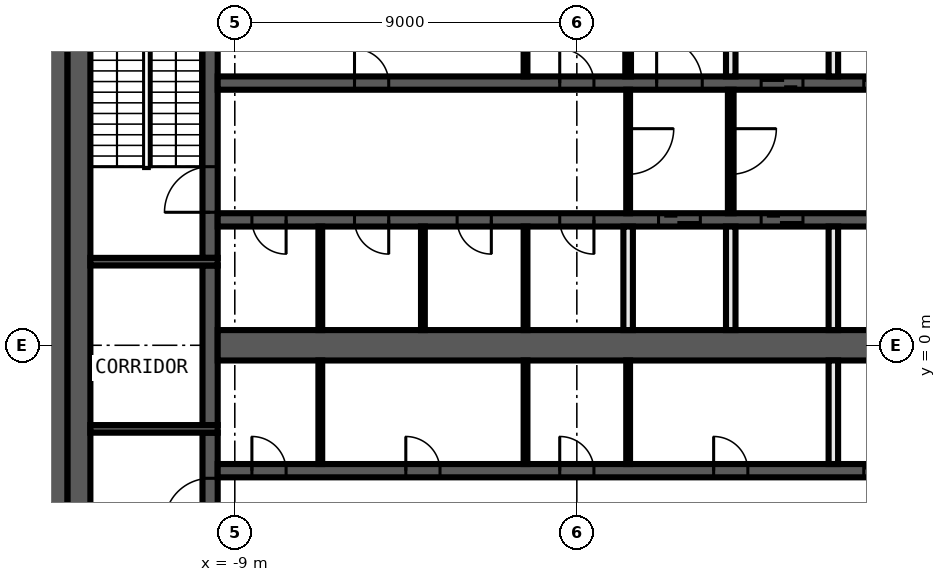
"""IFC4 building model, lengths in metres.
Left out: names, types, materials, properties, quantities, classifications, styles, units other than length and angle.
Written with IfcOpenShell. Run it as: python <this file> out.ifc"""

import sys

from ifc_helpers import new_model, si_unit, direction, frame, frame_2d, origin, place, context, subcontext, project, spatial, rectangle, extrude, element, fill, save


model = new_model("IFC4")
c1 = context("Model", 3, precision=1e-05, world=origin(), true_north=direction((0.0, 1.0)))
c2 = subcontext(c1, "Body", "Model", "MODEL_VIEW")
j1 = project(units=[si_unit("LENGTHUNIT", "METRE"), si_unit("PLANEANGLEUNIT", "RADIAN")], contexts=[c1])
p1 = place(None, origin())
s1 = spatial("IfcSite", under=j1, at=p1, CompositionType="ELEMENT")
p2 = place(p1, origin())
s2 = spatial("IfcBuilding", under=s1, at=p2, CompositionType="ELEMENT")
p3 = place(p2, frame((0.0, 0.0, 332.0)))
s3 = spatial("IfcBuildingStorey", under=s2, at=p3, CompositionType="ELEMENT", Elevation=332.0)
p4 = place(p3, frame((-13.7, -10.4, 0.0), z_axis=(0.0, 0.0, 1.0), x_axis=(0.0, 1.0, 0.0)))
e1 = element("IfcWall", 1, at=p4, inside=s3, PredefinedType="SHEAR", context=c2, shape_type="SweptSolid", body=[
    extrude(rectangle(XDim=20.8, YDim=0.6, at=frame_2d((10.4, 0.0))), origin(), (0.0, 0.0, 1.0), 3.82),
])
p5 = place(p3, frame((-13.1, -9.8, 0.0), z_axis=(0.0, 0.0, 1.0), x_axis=(0.0, 1.0, 0.0)))
e2 = element("IfcWall", 2, at=p5, inside=s3, PredefinedType="SHEAR", context=c2, shape_type="SweptSolid", body=[
    extrude(rectangle(XDim=19.6, YDim=0.6, at=frame_2d((9.8, 0.0))), origin(), (0.0, 0.0, 1.0), 3.82),
])
p6 = place(p3, frame((-9.65, -9.8, 0.0), z_axis=(0.0, 0.0, 1.0), x_axis=(0.0, 1.0, 0.0)))
e3 = element("IfcWall", 3, at=p6, inside=s3, PredefinedType="SHEAR", context=c2, shape_type="SweptSolid", body=[
    extrude(rectangle(XDim=7.5, YDim=0.4, at=frame_2d((3.75, 0.0))), origin(), (0.0, 0.0, 1.0), 3.82),
])
p7 = place(p6, frame((5.1, 0.0, 0.0)))
e4 = element("IfcOpeningElement", 4, at=p7, cuts=e3, PredefinedType="OPENING", context=c2, shape_type="SweptSolid", body=[
    extrude(rectangle(XDim=1.2, YDim=2.1, at=frame_2d((0.6, 1.05))), frame((0.0, 0.21, 0.0), z_axis=(0.0, -1.0, 0.0), x_axis=(1.0, 0.0, 0.0)), (0.0, 0.0, 1.0), 0.42),
])
p8 = place(p3, frame((-9.65, -2.1, 0.0), z_axis=(0.0, 0.0, 1.0), x_axis=(0.0, 1.0, 0.0)))
e5 = element("IfcWall", 5, at=p8, inside=s3, PredefinedType="SHEAR", context=c2, shape_type="SweptSolid", body=[
    extrude(rectangle(XDim=4.2, YDim=0.4, at=frame_2d((2.1, 0.0))), origin(), (0.0, 0.0, 1.0), 3.82),
])
p9 = place(p3, frame((-9.65, 2.3, 0.0), z_axis=(0.0, 0.0, 1.0), x_axis=(0.0, 1.0, 0.0)))
e6 = element("IfcWall", 6, at=p9, inside=s3, PredefinedType="SHEAR", context=c2, shape_type="SweptSolid", body=[
    extrude(rectangle(XDim=7.5, YDim=0.4, at=frame_2d((3.75, 0.0))), origin(), (0.0, 0.0, 1.0), 3.82),
])
p10 = place(p9, frame((1.2, 0.0, 0.0)))
e7 = element("IfcOpeningElement", 7, at=p10, cuts=e6, PredefinedType="OPENING", context=c2, shape_type="SweptSolid", body=[
    extrude(rectangle(XDim=1.2, YDim=2.1, at=frame_2d((0.6, 1.05))), frame((0.0, 0.21, 0.0), z_axis=(0.0, -1.0, 0.0), x_axis=(1.0, 0.0, 0.0)), (0.0, 0.0, 1.0), 0.42),
])
for number, where, z_axis, x_axis in (
    (8, (-9.45, 2.2, 0.0), (0.0, 0.0, 1.0), (-1.0, 0.0, 0.0)),
    (9, (-9.45, -2.2, 0.0), (0.0, 0.0, 1.0), (-1.0, 0.0, 0.0)),
):
    element("IfcWall", number, at=place(p3, frame(where, z_axis=z_axis, x_axis=x_axis)), inside=s3, PredefinedType="SHEAR", context=c2, shape_type="SweptSolid", body=[
        extrude(rectangle(XDim=3.35, YDim=0.2, at=frame_2d((1.675, 0.0))), origin(), (0.0, 0.0, 1.0), 3.82),
    ])
p11 = place(p3, frame((-9.45, 6.9, 0.0), z_axis=(0.0, 0.0, 1.0), x_axis=(1.0, 0.0, 0.0)))
e10 = element("IfcWall", 10, at=p11, inside=s3, PredefinedType="SHEAR", context=c2, shape_type="SweptSolid", body=[
    extrude(rectangle(XDim=18.9, YDim=0.35, at=frame_2d((9.45, 0.0))), origin(), (0.0, 0.0, 1.0), 3.82),
])
p12 = place(p11, frame((11.55, 0.0, 0.0)))
e11 = element("IfcOpeningElement", 11, at=p12, cuts=e10, PredefinedType="OPENING", context=c2, shape_type="SweptSolid", body=[
    extrude(rectangle(XDim=1.2, YDim=2.1, at=frame_2d((0.6, 1.05))), frame((0.0, 0.185, 0.0), z_axis=(0.0, -1.0, 0.0), x_axis=(1.0, 0.0, 0.0)), (0.0, 0.0, 1.0), 0.37),
])
p13 = place(p11, frame((14.3, 0.0, 0.0)))
e12 = element("IfcOpeningElement", 12, at=p13, cuts=e10, PredefinedType="OPENING", context=c2, shape_type="SweptSolid", body=[
    extrude(rectangle(XDim=1.1, YDim=2.1, at=frame_2d((0.55, 1.05))), frame((0.0, 0.185, 0.0), z_axis=(0.0, -1.0, 0.0), x_axis=(1.0, 0.0, 0.0)), (0.0, 0.0, 1.0), 0.37),
])
p14 = place(p11, frame((17.0, 0.0, 0.0)))
e13 = element("IfcOpeningElement", 13, at=p14, cuts=e10, PredefinedType="OPENING", context=c2, shape_type="SweptSolid", body=[
    extrude(rectangle(XDim=1.1, YDim=2.1, at=frame_2d((0.55, 1.05))), frame((0.0, 0.185, 0.0), z_axis=(0.0, -1.0, 0.0), x_axis=(1.0, 0.0, 0.0)), (0.0, 0.0, 1.0), 0.37),
])
p15 = place(p11, frame((3.6, 0.0, 0.0)))
e14 = element("IfcOpeningElement", 14, at=p15, cuts=e10, PredefinedType="OPENING", context=c2, shape_type="SweptSolid", body=[
    extrude(rectangle(XDim=0.9, YDim=2.1, at=frame_2d((0.45, 1.05))), frame((0.0, 0.185, 0.0), z_axis=(0.0, -1.0, 0.0), x_axis=(1.0, 0.0, 0.0)), (0.0, 0.0, 1.0), 0.37),
])
p16 = place(p11, frame((9.0, 0.0, 0.0)))
e15 = element("IfcOpeningElement", 15, at=p16, cuts=e10, PredefinedType="OPENING", context=c2, shape_type="SweptSolid", body=[
    extrude(rectangle(XDim=0.9, YDim=2.1, at=frame_2d((0.45, 1.05))), frame((0.0, 0.185, 0.0), z_axis=(0.0, -1.0, 0.0), x_axis=(1.0, 0.0, 0.0)), (0.0, 0.0, 1.0), 0.37),
])
p17 = place(p3, frame((9.45, 3.3, 0.0), z_axis=(0.0, 0.0, 1.0), x_axis=(-1.0, 0.0, 0.0)))
e16 = element("IfcWall", 16, at=p17, inside=s3, PredefinedType="SHEAR", context=c2, shape_type="SweptSolid", body=[
    extrude(rectangle(XDim=18.9, YDim=0.35, at=frame_2d((9.45, 0.0))), origin(), (0.0, 0.0, 1.0), 3.82),
])
p18 = place(p17, frame((6.2, 0.0, 0.0)))
e17 = element("IfcOpeningElement", 17, at=p18, cuts=e16, PredefinedType="OPENING", context=c2, shape_type="SweptSolid", body=[
    extrude(rectangle(XDim=1.1, YDim=2.1, at=frame_2d((0.55, 1.05))), frame((0.0, 0.185, 0.0), z_axis=(0.0, -1.0, 0.0), x_axis=(1.0, 0.0, 0.0)), (0.0, 0.0, 1.0), 0.37),
])
p19 = place(p17, frame((3.5, 0.0, 0.0)))
e18 = element("IfcOpeningElement", 18, at=p19, cuts=e16, PredefinedType="OPENING", context=c2, shape_type="SweptSolid", body=[
    extrude(rectangle(XDim=1.1, YDim=2.1, at=frame_2d((0.55, 1.05))), frame((0.0, 0.185, 0.0), z_axis=(0.0, -1.0, 0.0), x_axis=(1.0, 0.0, 0.0)), (0.0, 0.0, 1.0), 0.37),
])
p20 = place(p17, frame((0.9, 0.0, 0.0)))
e19 = element("IfcOpeningElement", 19, at=p20, cuts=e16, PredefinedType="OPENING", context=c2, shape_type="SweptSolid", body=[
    extrude(rectangle(XDim=0.9, YDim=2.1, at=frame_2d((0.45, 1.05))), frame((0.0, 0.185, 0.0), z_axis=(0.0, -1.0, 0.0), x_axis=(1.0, 0.0, 0.0)), (0.0, 0.0, 1.0), 0.37),
])
p21 = place(p17, frame((17.1, 0.0, 0.0)))
e20 = element("IfcOpeningElement", 20, at=p21, cuts=e16, PredefinedType="OPENING", context=c2, shape_type="SweptSolid", body=[
    extrude(rectangle(XDim=0.9, YDim=2.1, at=frame_2d((0.45, 1.05))), frame((0.0, 0.185, 0.0), z_axis=(0.0, -1.0, 0.0), x_axis=(1.0, 0.0, 0.0)), (0.0, 0.0, 1.0), 0.37),
])
p22 = place(p17, frame((14.4, 0.0, 0.0)))
e21 = element("IfcOpeningElement", 21, at=p22, cuts=e16, PredefinedType="OPENING", context=c2, shape_type="SweptSolid", body=[
    extrude(rectangle(XDim=0.9, YDim=2.1, at=frame_2d((0.45, 1.05))), frame((0.0, 0.185, 0.0), z_axis=(0.0, -1.0, 0.0), x_axis=(1.0, 0.0, 0.0)), (0.0, 0.0, 1.0), 0.37),
])
p23 = place(p17, frame((11.7, 0.0, 0.0)))
e22 = element("IfcOpeningElement", 22, at=p23, cuts=e16, PredefinedType="OPENING", context=c2, shape_type="SweptSolid", body=[
    extrude(rectangle(XDim=0.9, YDim=2.1, at=frame_2d((0.45, 1.05))), frame((0.0, 0.185, 0.0), z_axis=(0.0, -1.0, 0.0), x_axis=(1.0, 0.0, 0.0)), (0.0, 0.0, 1.0), 0.37),
])
p24 = place(p17, frame((9.0, 0.0, 0.0)))
e23 = element("IfcOpeningElement", 23, at=p24, cuts=e16, PredefinedType="OPENING", context=c2, shape_type="SweptSolid", body=[
    extrude(rectangle(XDim=0.9, YDim=2.1, at=frame_2d((0.45, 1.05))), frame((0.0, 0.185, 0.0), z_axis=(0.0, -1.0, 0.0), x_axis=(1.0, 0.0, 0.0)), (0.0, 0.0, 1.0), 0.37),
])
p25 = place(p3, frame((-9.45, -3.3, 0.0), z_axis=(0.0, 0.0, 1.0), x_axis=(1.0, 0.0, 0.0)))
e24 = element("IfcWall", 24, at=p25, inside=s3, PredefinedType="SHEAR", context=c2, shape_type="SweptSolid", body=[
    extrude(rectangle(XDim=18.9, YDim=0.35, at=frame_2d((9.45, 0.0))), origin(), (0.0, 0.0, 1.0), 3.82),
])
p26 = place(p25, frame((17.0, 0.0, 0.0)))
e25 = element("IfcOpeningElement", 25, at=p26, cuts=e24, PredefinedType="OPENING", context=c2, shape_type="SweptSolid", body=[
    extrude(rectangle(XDim=1.1, YDim=2.1, at=frame_2d((0.55, 1.05))), frame((0.0, 0.185, 0.0), z_axis=(0.0, -1.0, 0.0), x_axis=(1.0, 0.0, 0.0)), (0.0, 0.0, 1.0), 0.37),
])
p27 = place(p25, frame((0.9, 0.0, 0.0)))
e26 = element("IfcOpeningElement", 26, at=p27, cuts=e24, PredefinedType="OPENING", context=c2, shape_type="SweptSolid", body=[
    extrude(rectangle(XDim=0.9, YDim=2.1, at=frame_2d((0.45, 1.05))), frame((0.0, 0.185, 0.0), z_axis=(0.0, -1.0, 0.0), x_axis=(1.0, 0.0, 0.0)), (0.0, 0.0, 1.0), 0.37),
])
p28 = place(p25, frame((4.95, 0.0, 0.0)))
e27 = element("IfcOpeningElement", 27, at=p28, cuts=e24, PredefinedType="OPENING", context=c2, shape_type="SweptSolid", body=[
    extrude(rectangle(XDim=0.9, YDim=2.1, at=frame_2d((0.45, 1.05))), frame((0.0, 0.185, 0.0), z_axis=(0.0, -1.0, 0.0), x_axis=(1.0, 0.0, 0.0)), (0.0, 0.0, 1.0), 0.37),
])
p29 = place(p25, frame((9.0, 0.0, 0.0)))
e28 = element("IfcOpeningElement", 28, at=p29, cuts=e24, PredefinedType="OPENING", context=c2, shape_type="SweptSolid", body=[
    extrude(rectangle(XDim=0.9, YDim=2.1, at=frame_2d((0.45, 1.05))), frame((0.0, 0.185, 0.0), z_axis=(0.0, -1.0, 0.0), x_axis=(1.0, 0.0, 0.0)), (0.0, 0.0, 1.0), 0.37),
])
p30 = place(p25, frame((13.05, 0.0, 0.0)))
e29 = element("IfcOpeningElement", 29, at=p30, cuts=e24, PredefinedType="OPENING", context=c2, shape_type="SweptSolid", body=[
    extrude(rectangle(XDim=0.9, YDim=2.1, at=frame_2d((0.45, 1.05))), frame((0.0, 0.185, 0.0), z_axis=(0.0, -1.0, 0.0), x_axis=(1.0, 0.0, 0.0)), (0.0, 0.0, 1.0), 0.37),
])
p31 = place(p3, frame((-9.45, 0.0, 0.0), z_axis=(0.0, 0.0, 1.0), x_axis=(1.0, 0.0, 0.0)))
e30 = element("IfcWall", 30, at=p31, inside=s3, PredefinedType="SHEAR", context=c2, shape_type="SweptSolid", body=[
    extrude(rectangle(XDim=18.9, YDim=0.8, at=frame_2d((9.45, 0.0))), origin(), (0.0, 0.0, 1.0), 3.82),
])
for number, where, z_axis, x_axis in (
    (31, (6.75, -3.125, 0.0), (0.0, 0.0, 1.0), (0.0, 1.0, 0.0)),
    (32, (6.75, 0.4, 0.0), (0.0, 0.0, 1.0), (0.0, 1.0, 0.0)),
    (33, (6.75, 7.075, 0.0), (0.0, 0.0, 1.0), (0.0, 1.0, 0.0)),
):
    element("IfcWall", number, at=place(p3, frame(where, z_axis=z_axis, x_axis=x_axis)), inside=s3, PredefinedType="SOLIDWALL", context=c2, shape_type="SweptSolid", body=[
        extrude(rectangle(XDim=2.725, YDim=0.25, at=frame_2d((1.363, 0.0))), origin(), (0.0, 0.0, 1.0), 3.82),
    ])
p32 = place(p3, frame((4.05, 6.725, 0.0), z_axis=(0.0, 0.0, 1.0), x_axis=(0.0, -1.0, 0.0)))
e34 = element("IfcWall", 34, at=p32, inside=s3, PredefinedType="PARTITIONING", context=c2, shape_type="SweptSolid", body=[
    extrude(rectangle(XDim=3.25, YDim=0.15, at=frame_2d((1.625, 0.0))), origin(), (0.0, 0.0, 1.0), 3.82),
])
p33 = place(p32, frame((1.025, 0.0, 0.0)))
e35 = element("IfcOpeningElement", 35, at=p33, cuts=e34, PredefinedType="OPENING", context=c2, shape_type="SweptSolid", body=[
    extrude(rectangle(XDim=1.2, YDim=2.1, at=frame_2d((0.6, 1.05))), frame((0.0, 0.085, 0.0), z_axis=(0.0, -1.0, 0.0), x_axis=(1.0, 0.0, 0.0)), (0.0, 0.0, 1.0), 0.17),
])
for number, where, z_axis, x_axis in (
    (36, (4.05, 0.4, 0.0), (0.0, 0.0, 1.0), (0.0, 1.0, 0.0)),
    (37, (4.05, 7.075, 0.0), (0.0, 0.0, 1.0), (0.0, 1.0, 0.0)),
):
    element("IfcWall", number, at=place(p3, frame(where, z_axis=z_axis, x_axis=x_axis)), inside=s3, PredefinedType="SOLIDWALL", context=c2, shape_type="SweptSolid", body=[
        extrude(rectangle(XDim=2.725, YDim=0.25, at=frame_2d((1.363, 0.0))), origin(), (0.0, 0.0, 1.0), 3.82),
    ])
p34 = place(p3, frame((1.35, 7.075, 0.0), z_axis=(0.0, 0.0, 1.0), x_axis=(0.0, 1.0, 0.0)))
e38 = element("IfcWall", 38, at=p34, inside=s3, PredefinedType="PARTITIONING", context=c2, shape_type="SweptSolid", body=[
    extrude(rectangle(XDim=2.725, YDim=0.15, at=frame_2d((1.363, 0.0))), origin(), (0.0, 0.0, 1.0), 3.82),
])
p35 = place(p3, frame((1.35, -3.125, 0.0), z_axis=(0.0, 0.0, 1.0), x_axis=(0.0, 1.0, 0.0)))
e39 = element("IfcWall", 39, at=p35, inside=s3, PredefinedType="PARTITIONING", context=c2, shape_type="SweptSolid", body=[
    extrude(rectangle(XDim=2.725, YDim=0.1, at=frame_2d((1.363, 0.0))), origin(), (0.0, 0.0, 1.0), 3.82),
])
p36 = place(p3, frame((1.35, 6.725, 0.0), z_axis=(0.0, 0.0, 1.0), x_axis=(0.0, -1.0, 0.0)))
e40 = element("IfcWall", 40, at=p36, inside=s3, PredefinedType="PARTITIONING", context=c2, shape_type="SweptSolid", body=[
    extrude(rectangle(XDim=3.25, YDim=0.1, at=frame_2d((1.625, 0.0))), origin(), (0.0, 0.0, 1.0), 3.82),
])
p37 = place(p36, frame((1.025, 0.0, 0.0)))
e41 = element("IfcOpeningElement", 41, at=p37, cuts=e40, PredefinedType="OPENING", context=c2, shape_type="SweptSolid", body=[
    extrude(rectangle(XDim=1.2, YDim=2.1, at=frame_2d((0.6, 1.05))), frame((0.0, 0.06, 0.0), z_axis=(0.0, -1.0, 0.0), x_axis=(1.0, 0.0, 0.0)), (0.0, 0.0, 1.0), 0.12),
])
p38 = place(p3, frame((1.35, 0.4, 0.0), z_axis=(0.0, 0.0, 1.0), x_axis=(0.0, 1.0, 0.0)))
e42 = element("IfcWall", 42, at=p38, inside=s3, PredefinedType="SOLIDWALL", context=c2, shape_type="SweptSolid", body=[
    extrude(rectangle(XDim=2.725, YDim=0.25, at=frame_2d((1.363, 0.0))), origin(), (0.0, 0.0, 1.0), 3.82),
])
for number, where, z_axis, x_axis in (
    (43, (-1.35, -3.125, 0.0), (0.0, 0.0, 1.0), (0.0, 1.0, 0.0)),
    (44, (-1.35, 0.4, 0.0), (0.0, 0.0, 1.0), (0.0, 1.0, 0.0)),
    (45, (-1.35, 7.075, 0.0), (0.0, 0.0, 1.0), (0.0, 1.0, 0.0)),
    (46, (-4.05, 0.4, 0.0), (0.0, 0.0, 1.0), (0.0, 1.0, 0.0)),
    (47, (-6.75, -3.125, 0.0), (0.0, 0.0, 1.0), (0.0, 1.0, 0.0)),
    (48, (-6.75, 0.4, 0.0), (0.0, 0.0, 1.0), (0.0, 1.0, 0.0)),
):
    element("IfcWall", number, at=place(p3, frame(where, z_axis=z_axis, x_axis=x_axis)), inside=s3, PredefinedType="PARTITIONING", context=c2, shape_type="SweptSolid", body=[
        extrude(rectangle(XDim=2.725, YDim=0.1, at=frame_2d((1.363, 0.0))), origin(), (0.0, 0.0, 1.0), 3.82),
    ])
p39 = place(p12, origin())
e49 = element("IfcDoor", 49, at=p39, inside=s3, OperationType="SINGLE_SWING_LEFT", PredefinedType="DOOR", context=c2, shape_type="SweptSolid", body=[
    extrude(rectangle(XDim=1.2, YDim=2.1, at=frame_2d((0.6, 1.05))), frame((0.0, 0.025, 0.0), z_axis=(0.0, -1.0, 0.0), x_axis=(1.0, 0.0, 0.0)), (0.0, 0.0, 1.0), 0.05),
])
fill(e11, e49)
p40 = place(p13, origin())
e50 = element("IfcDoor", 50, at=p40, inside=s3, OperationType="DOUBLE_DOOR_SLIDING", PredefinedType="DOOR", context=c2, shape_type="SweptSolid", body=[
    extrude(rectangle(XDim=1.1, YDim=2.1, at=frame_2d((0.55, 1.05))), frame((0.0, 0.025, 0.0), z_axis=(0.0, -1.0, 0.0), x_axis=(1.0, 0.0, 0.0)), (0.0, 0.0, 1.0), 0.05),
])
fill(e12, e50)
p41 = place(p14, origin())
e51 = element("IfcDoor", 51, at=p41, inside=s3, OperationType="DOUBLE_DOOR_SLIDING", PredefinedType="DOOR", context=c2, shape_type="SweptSolid", body=[
    extrude(rectangle(XDim=1.1, YDim=2.1, at=frame_2d((0.55, 1.05))), frame((0.0, 0.025, 0.0), z_axis=(0.0, -1.0, 0.0), x_axis=(1.0, 0.0, 0.0)), (0.0, 0.0, 1.0), 0.05),
])
fill(e13, e51)
p42 = place(p18, origin())
e52 = element("IfcDoor", 52, at=p42, inside=s3, OperationType="DOUBLE_DOOR_SLIDING", PredefinedType="DOOR", context=c2, shape_type="SweptSolid", body=[
    extrude(rectangle(XDim=1.1, YDim=2.1, at=frame_2d((0.55, 1.05))), frame((0.0, 0.025, 0.0), z_axis=(0.0, -1.0, 0.0), x_axis=(1.0, 0.0, 0.0)), (0.0, 0.0, 1.0), 0.05),
])
fill(e17, e52)
p43 = place(p19, origin())
e53 = element("IfcDoor", 53, at=p43, inside=s3, OperationType="DOUBLE_DOOR_SLIDING", PredefinedType="DOOR", context=c2, shape_type="SweptSolid", body=[
    extrude(rectangle(XDim=1.1, YDim=2.1, at=frame_2d((0.55, 1.05))), frame((0.0, 0.025, 0.0), z_axis=(0.0, -1.0, 0.0), x_axis=(1.0, 0.0, 0.0)), (0.0, 0.0, 1.0), 0.05),
])
fill(e18, e53)
p44 = place(p26, origin())
e54 = element("IfcDoor", 54, at=p44, inside=s3, OperationType="DOUBLE_DOOR_SLIDING", PredefinedType="DOOR", context=c2, shape_type="SweptSolid", body=[
    extrude(rectangle(XDim=1.1, YDim=2.1, at=frame_2d((0.55, 1.05))), frame((0.0, 0.025, 0.0), z_axis=(0.0, -1.0, 0.0), x_axis=(1.0, 0.0, 0.0)), (0.0, 0.0, 1.0), 0.05),
])
fill(e25, e54)
p45 = place(p15, origin())
e55 = element("IfcDoor", 55, at=p45, inside=s3, OperationType="SINGLE_SWING_RIGHT", PredefinedType="DOOR", context=c2, shape_type="SweptSolid", body=[
    extrude(rectangle(XDim=0.9, YDim=2.1, at=frame_2d((0.45, 1.05))), frame((0.0, 0.025, 0.0), z_axis=(0.0, -1.0, 0.0), x_axis=(1.0, 0.0, 0.0)), (0.0, 0.0, 1.0), 0.05),
])
fill(e14, e55)
p46 = place(p16, origin())
e56 = element("IfcDoor", 56, at=p46, inside=s3, OperationType="SINGLE_SWING_LEFT", PredefinedType="DOOR", context=c2, shape_type="SweptSolid", body=[
    extrude(rectangle(XDim=0.9, YDim=2.1, at=frame_2d((0.45, 1.05))), frame((0.0, 0.025, 0.0), z_axis=(0.0, -1.0, 0.0), x_axis=(1.0, 0.0, 0.0)), (0.0, 0.0, 1.0), 0.05),
])
fill(e15, e56)
p47 = place(p21, origin())
e57 = element("IfcDoor", 57, at=p47, inside=s3, OperationType="SINGLE_SWING_RIGHT", PredefinedType="DOOR", context=c2, shape_type="SweptSolid", body=[
    extrude(rectangle(XDim=0.9, YDim=2.1, at=frame_2d((0.45, 1.05))), frame((0.0, 0.025, 0.0), z_axis=(0.0, -1.0, 0.0), x_axis=(1.0, 0.0, 0.0)), (0.0, 0.0, 1.0), 0.05),
])
fill(e20, e57)
p48 = place(p22, origin())
e58 = element("IfcDoor", 58, at=p48, inside=s3, OperationType="SINGLE_SWING_LEFT", PredefinedType="DOOR", context=c2, shape_type="SweptSolid", body=[
    extrude(rectangle(XDim=0.9, YDim=2.1, at=frame_2d((0.45, 1.05))), frame((0.0, 0.025, 0.0), z_axis=(0.0, -1.0, 0.0), x_axis=(1.0, 0.0, 0.0)), (0.0, 0.0, 1.0), 0.05),
])
fill(e21, e58)
p49 = place(p23, origin())
e59 = element("IfcDoor", 59, at=p49, inside=s3, OperationType="SINGLE_SWING_RIGHT", PredefinedType="DOOR", context=c2, shape_type="SweptSolid", body=[
    extrude(rectangle(XDim=0.9, YDim=2.1, at=frame_2d((0.45, 1.05))), frame((0.0, 0.025, 0.0), z_axis=(0.0, -1.0, 0.0), x_axis=(1.0, 0.0, 0.0)), (0.0, 0.0, 1.0), 0.05),
])
fill(e22, e59)
p50 = place(p24, origin())
e60 = element("IfcDoor", 60, at=p50, inside=s3, OperationType="SINGLE_SWING_LEFT", PredefinedType="DOOR", context=c2, shape_type="SweptSolid", body=[
    extrude(rectangle(XDim=0.9, YDim=2.1, at=frame_2d((0.45, 1.05))), frame((0.0, 0.025, 0.0), z_axis=(0.0, -1.0, 0.0), x_axis=(1.0, 0.0, 0.0)), (0.0, 0.0, 1.0), 0.05),
])
fill(e23, e60)
p51 = place(p27, origin())
e61 = element("IfcDoor", 61, at=p51, inside=s3, OperationType="SINGLE_SWING_RIGHT", PredefinedType="DOOR", context=c2, shape_type="SweptSolid", body=[
    extrude(rectangle(XDim=0.9, YDim=2.1, at=frame_2d((0.45, 1.05))), frame((0.0, 0.025, 0.0), z_axis=(0.0, -1.0, 0.0), x_axis=(1.0, 0.0, 0.0)), (0.0, 0.0, 1.0), 0.05),
])
fill(e26, e61)
p52 = place(p28, origin())
e62 = element("IfcDoor", 62, at=p52, inside=s3, OperationType="SINGLE_SWING_LEFT", PredefinedType="DOOR", context=c2, shape_type="SweptSolid", body=[
    extrude(rectangle(XDim=0.9, YDim=2.1, at=frame_2d((0.45, 1.05))), frame((0.0, 0.025, 0.0), z_axis=(0.0, -1.0, 0.0), x_axis=(1.0, 0.0, 0.0)), (0.0, 0.0, 1.0), 0.05),
])
fill(e27, e62)
p53 = place(p29, origin())
e63 = element("IfcDoor", 63, at=p53, inside=s3, OperationType="SINGLE_SWING_RIGHT", PredefinedType="DOOR", context=c2, shape_type="SweptSolid", body=[
    extrude(rectangle(XDim=0.9, YDim=2.1, at=frame_2d((0.45, 1.05))), frame((0.0, 0.025, 0.0), z_axis=(0.0, -1.0, 0.0), x_axis=(1.0, 0.0, 0.0)), (0.0, 0.0, 1.0), 0.05),
])
fill(e28, e63)
p54 = place(p30, origin())
e64 = element("IfcDoor", 64, at=p54, inside=s3, OperationType="SINGLE_SWING_LEFT", PredefinedType="DOOR", context=c2, shape_type="SweptSolid", body=[
    extrude(rectangle(XDim=0.9, YDim=2.1, at=frame_2d((0.45, 1.05))), frame((0.0, 0.025, 0.0), z_axis=(0.0, -1.0, 0.0), x_axis=(1.0, 0.0, 0.0)), (0.0, 0.0, 1.0), 0.05),
])
fill(e29, e64)
p55 = place(p10, origin())
e65 = element("IfcDoor", 65, at=p55, inside=s3, OperationType="SINGLE_SWING_RIGHT", PredefinedType="DOOR", context=c2, shape_type="SweptSolid", body=[
    extrude(rectangle(XDim=1.2, YDim=2.1, at=frame_2d((0.6, 1.05))), frame((0.0, 0.025, 0.0), z_axis=(0.0, -1.0, 0.0), x_axis=(1.0, 0.0, 0.0)), (0.0, 0.0, 1.0), 0.05),
])
fill(e7, e65)
p56 = place(p7, origin())
e66 = element("IfcDoor", 66, at=p56, inside=s3, OperationType="SINGLE_SWING_LEFT", PredefinedType="DOOR", context=c2, shape_type="SweptSolid", body=[
    extrude(rectangle(XDim=1.2, YDim=2.1, at=frame_2d((0.6, 1.05))), frame((0.0, 0.025, 0.0), z_axis=(0.0, -1.0, 0.0), x_axis=(1.0, 0.0, 0.0)), (0.0, 0.0, 1.0), 0.05),
])
fill(e4, e66)
p57 = place(p37, origin())
e67 = element("IfcDoor", 67, at=p57, inside=s3, OperationType="SINGLE_SWING_LEFT", PredefinedType="DOOR", context=c2, shape_type="SweptSolid", body=[
    extrude(rectangle(XDim=1.2, YDim=2.1, at=frame_2d((0.6, 1.05))), frame((0.0, 0.025, 0.0), z_axis=(0.0, -1.0, 0.0), x_axis=(1.0, 0.0, 0.0)), (0.0, 0.0, 1.0), 0.05),
])
fill(e41, e67)
p58 = place(p33, origin())
e68 = element("IfcDoor", 68, at=p58, inside=s3, OperationType="SINGLE_SWING_RIGHT", PredefinedType="DOOR", context=c2, shape_type="SweptSolid", body=[
    extrude(rectangle(XDim=1.2, YDim=2.1, at=frame_2d((0.6, 1.05))), frame((0.0, 0.025, 0.0), z_axis=(0.0, -1.0, 0.0), x_axis=(1.0, 0.0, 0.0)), (0.0, 0.0, 1.0), 0.05),
])
fill(e35, e68)
save(model, sys.argv[1])
